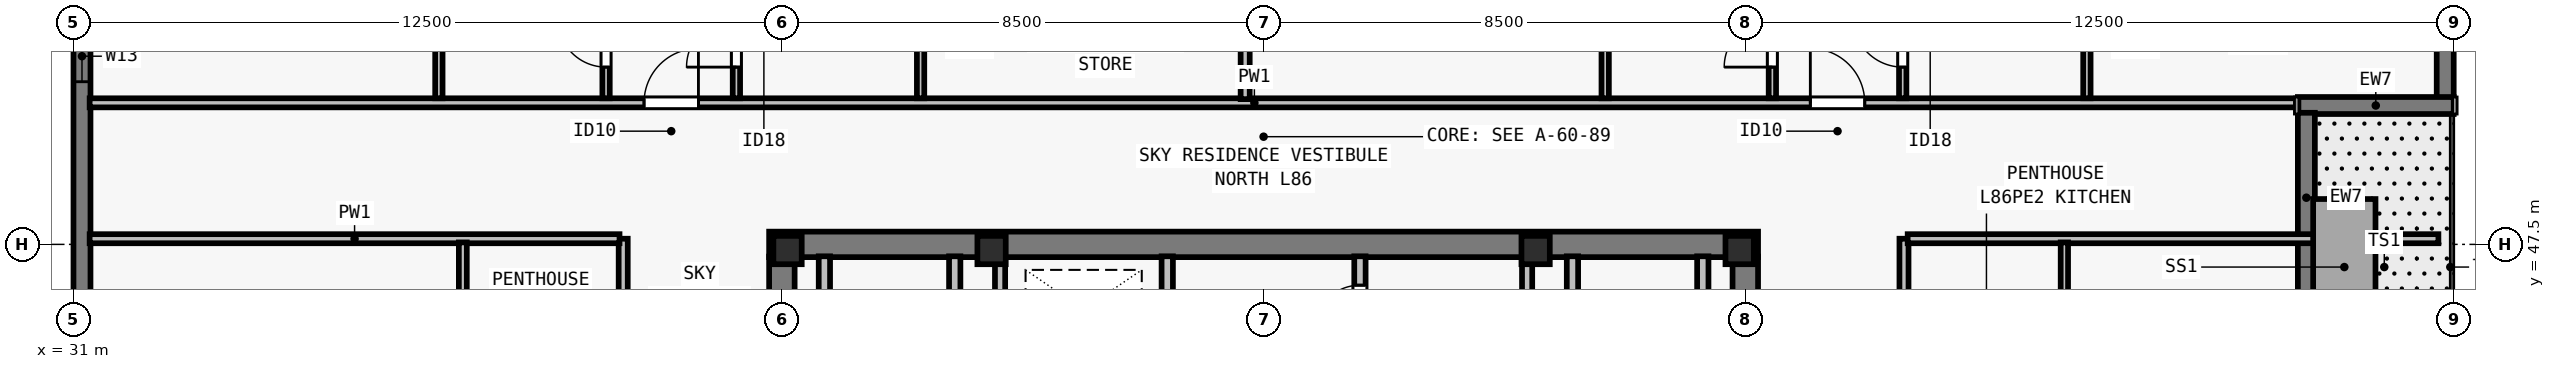
"""IFC4 building model, lengths in metres.
Left out: names, types, materials, properties, quantities, classifications, styles, units other than length and angle.
Written with IfcOpenShell. Run it as: python <this file> out.ifc"""

import sys

from ifc_helpers import new_model, si_unit, direction, frame, frame_2d, origin, origin_2d, place, context, subcontext, project, spatial, rectangle, i_section, extrude, element, fill, save


model = new_model("IFC4")
c1 = context("Model", 3, precision=1e-05, world=origin(), true_north=direction((0.0, 1.0)))
c2 = subcontext(c1, "Body", "Model", "MODEL_VIEW")
j1 = project(units=[si_unit("LENGTHUNIT", "METRE"), si_unit("PLANEANGLEUNIT", "RADIAN")], contexts=[c1])
p1 = place(None, origin())
s1 = spatial("IfcSite", under=j1, at=p1, CompositionType="ELEMENT")
p2 = place(p1, origin())
s2 = spatial("IfcBuilding", under=s1, at=p2, CompositionType="ELEMENT")
p3 = place(p2, frame((0.0, 0.0, 312.0)))
s3 = spatial("IfcBuildingStorey", under=s2, at=p3, CompositionType="ELEMENT", Elevation=312.0)
for number, where, z_axis, x_axis in (
    (1, (43.6, 47.4, 0.0), (0.0, 0.0, 1.0), (1.0, 0.0, 0.0)),
    (2, (47.2, 47.4, 0.0), (0.0, 0.0, 1.0), (1.0, 0.0, 0.0)),
    (3, (56.8, 47.4, 0.0), (0.0, 0.0, 1.0), (1.0, 0.0, 0.0)),
    (4, (60.4, 47.4, 0.0), (0.0, 0.0, 1.0), (1.0, 0.0, 0.0)),
):
    element("IfcColumn", number, at=place(p3, frame(where, z_axis=z_axis, x_axis=x_axis)), inside=s3, PredefinedType="COLUMN", context=c2, shape_type="SweptSolid", body=[
        extrude(i_section(OverallWidth=0.5, OverallDepth=0.5, WebThickness=0.028, FlangeThickness=0.045, at=origin_2d()), origin(), (0.0, 0.0, 1.0), 3.5),
    ])
p4 = place(p3, frame((31.15, 23.5, 0.0), z_axis=(0.0, 0.0, 1.0), x_axis=(0.0, 1.0, 0.0)))
e5 = element("IfcWall", 5, at=p4, inside=s3, PredefinedType="SOLIDWALL", context=c2, shape_type="SweptSolid", body=[
    extrude(rectangle(XDim=30.722, YDim=0.3, at=frame_2d((15.361, 0.0))), origin(), (0.0, 0.0, 1.0), 3.29),
])
p5 = place(p4, frame((4.944, 0.0, 0.8)))
e6 = element("IfcOpeningElement", 6, at=p5, cuts=e5, PredefinedType="OPENING", context=c2, shape_type="SweptSolid", body=[
    extrude(rectangle(XDim=1.65, YDim=1.758, at=frame_2d((0.825, 0.879))), frame((0.0, 0.16, 0.0), z_axis=(0.0, -1.0, 0.0), x_axis=(1.0, 0.0, 0.0)), (0.0, 0.0, 1.0), 0.32),
])
p6 = place(p4, frame((7.756, 0.0, 0.8)))
e7 = element("IfcOpeningElement", 7, at=p6, cuts=e5, PredefinedType="OPENING", context=c2, shape_type="SweptSolid", body=[
    extrude(rectangle(XDim=2.0, YDim=1.758, at=frame_2d((1.0, 0.879))), frame((0.0, 0.16, 0.0), z_axis=(0.0, -1.0, 0.0), x_axis=(1.0, 0.0, 0.0)), (0.0, 0.0, 1.0), 0.32),
])
p7 = place(p4, frame((12.617, 0.0, 0.8)))
e8 = element("IfcOpeningElement", 8, at=p7, cuts=e5, PredefinedType="OPENING", context=c2, shape_type="SweptSolid", body=[
    extrude(rectangle(XDim=1.65, YDim=1.758, at=frame_2d((0.825, 0.879))), frame((0.0, 0.16, 0.0), z_axis=(0.0, -1.0, 0.0), x_axis=(1.0, 0.0, 0.0)), (0.0, 0.0, 1.0), 0.32),
])
p8 = place(p4, frame((17.53, 0.0, 0.8)))
e9 = element("IfcOpeningElement", 9, at=p8, cuts=e5, PredefinedType="OPENING", context=c2, shape_type="SweptSolid", body=[
    extrude(rectangle(XDim=2.0, YDim=1.758, at=frame_2d((1.0, 0.879))), frame((0.0, 0.16, 0.0), z_axis=(0.0, -1.0, 0.0), x_axis=(1.0, 0.0, 0.0)), (0.0, 0.0, 1.0), 0.32),
])
p9 = place(p4, frame((21.142, 0.0, 0.8)))
e10 = element("IfcOpeningElement", 10, at=p9, cuts=e5, PredefinedType="OPENING", context=c2, shape_type="SweptSolid", body=[
    extrude(rectangle(XDim=1.65, YDim=1.758, at=frame_2d((0.825, 0.879))), frame((0.0, 0.16, 0.0), z_axis=(0.0, -1.0, 0.0), x_axis=(1.0, 0.0, 0.0)), (0.0, 0.0, 1.0), 0.32),
])
p10 = place(p4, frame((26.87, 0.0, 0.8)))
e11 = element("IfcOpeningElement", 11, at=p10, cuts=e5, PredefinedType="OPENING", context=c2, shape_type="SweptSolid", body=[
    extrude(rectangle(XDim=0.9, YDim=1.75, at=frame_2d((0.45, 0.875))), frame((0.0, 0.16, 0.0), z_axis=(0.0, -1.0, 0.0), x_axis=(1.0, 0.0, 0.0)), (0.0, 0.0, 1.0), 0.32),
])
p11 = place(p3, frame((72.85, 54.5, 0.0), z_axis=(0.0, 0.0, 1.0), x_axis=(0.0, -1.0, 0.0)))
e12 = element("IfcWall", 12, at=p11, inside=s3, PredefinedType="SOLIDWALL", context=c2, shape_type="SweptSolid", body=[
    extrude(rectangle(XDim=4.422, YDim=0.3, at=frame_2d((2.211, 0.0))), origin(), (0.0, 0.0, 1.0), 3.29),
])
p12 = place(p3, frame((73.0, 49.95, 0.0), z_axis=(0.0, 0.0, 1.0), x_axis=(-1.0, 0.0, 0.0)))
e13 = element("IfcWall", 13, at=p12, inside=s3, PredefinedType="SOLIDWALL", context=c2, shape_type="SweptSolid", body=[
    extrude(rectangle(XDim=2.75, YDim=0.3, at=frame_2d((1.375, 0.0))), origin(), (0.0, 0.0, 1.0), 3.29),
])
p13 = place(p3, frame((70.4, 49.822, 0.0), z_axis=(0.0, 0.0, 1.0), x_axis=(0.0, -1.0, 0.0)))
e14 = element("IfcWall", 14, at=p13, inside=s3, PredefinedType="SOLIDWALL", context=c2, shape_type="SweptSolid", body=[
    extrude(rectangle(XDim=5.722, YDim=0.3, at=frame_2d((2.861, 0.0))), origin(), (0.0, 0.0, 1.0), 3.29),
])
p14 = place(p13, frame((3.147, 0.0, 0.0)))
e15 = element("IfcOpeningElement", 15, at=p14, cuts=e14, PredefinedType="OPENING", context=c2, shape_type="SweptSolid", body=[
    extrude(rectangle(XDim=1.0, YDim=2.15, at=frame_2d((0.5, 1.075))), frame((0.0, 0.16, 0.0), z_axis=(0.0, -1.0, 0.0), x_axis=(1.0, 0.0, 0.0)), (0.0, 0.0, 1.0), 0.32),
])
p15 = place(p3, frame((43.275, 47.5, 0.0), z_axis=(0.0, 0.0, 1.0), x_axis=(1.0, 0.0, 0.0)))
e16 = element("IfcWall", 16, at=p15, inside=s3, PredefinedType="SHEAR", context=c2, shape_type="SweptSolid", body=[
    extrude(rectangle(XDim=17.45, YDim=0.45, at=frame_2d((8.725, 0.0))), origin(), (0.0, 0.0, 1.0), 3.29),
])
for number, where, z_axis, x_axis in (
    (17, (43.5, 40.8, 0.0), (0.0, 0.0, 1.0), (0.0, 1.0, 0.0)),
    (18, (60.5, 40.8, 0.0), (0.0, 0.0, 1.0), (0.0, 1.0, 0.0)),
):
    element("IfcWall", number, at=place(p3, frame(where, z_axis=z_axis, x_axis=x_axis)), inside=s3, PredefinedType="SHEAR", context=c2, shape_type="SweptSolid", body=[
        extrude(rectangle(XDim=6.485, YDim=0.45, at=frame_2d((3.242, 0.0))), origin(), (0.0, 0.0, 1.0), 3.29),
    ])
p16 = place(p3, frame((50.3, 40.585, 0.0), z_axis=(0.0, 0.0, 1.0), x_axis=(0.0, 1.0, 0.0)))
e19 = element("IfcWall", 19, at=p16, inside=s3, PredefinedType="SOLIDWALL", context=c2, shape_type="SweptSolid", body=[
    extrude(rectangle(XDim=6.705, YDim=0.2, at=frame_2d((3.353, 0.0))), origin(), (0.0, 0.0, 1.0), 3.29),
])
p17 = place(p16, frame((0.515, 0.0, 0.0)))
e20 = element("IfcOpeningElement", 20, at=p17, cuts=e19, PredefinedType="OPENING", context=c2, shape_type="SweptSolid", body=[
    extrude(rectangle(XDim=1.1, YDim=2.2, at=frame_2d((0.55, 1.1))), frame((0.0, 0.11, 0.0), z_axis=(0.0, -1.0, 0.0), x_axis=(1.0, 0.0, 0.0)), (0.0, 0.0, 1.0), 0.22),
])
p18 = place(p16, frame((3.015, 0.0, 0.0)))
e21 = element("IfcOpeningElement", 21, at=p18, cuts=e19, PredefinedType="OPENING", context=c2, shape_type="SweptSolid", body=[
    extrude(rectangle(XDim=1.1, YDim=2.2, at=frame_2d((0.55, 1.1))), frame((0.0, 0.11, 0.0), z_axis=(0.0, -1.0, 0.0), x_axis=(1.0, 0.0, 0.0)), (0.0, 0.0, 1.0), 0.22),
])
p19 = place(p16, frame((5.065, 0.0, 0.0)))
e22 = element("IfcOpeningElement", 22, at=p19, cuts=e19, PredefinedType="OPENING", context=c2, shape_type="SweptSolid", body=[
    extrude(rectangle(XDim=0.8, YDim=2.08, at=frame_2d((0.4, 1.04))), frame((0.0, 0.11, 0.0), z_axis=(0.0, -1.0, 0.0), x_axis=(1.0, 0.0, 0.0)), (0.0, 0.0, 1.0), 0.22),
])
p20 = place(p3, frame((53.7, 40.585, 0.0), z_axis=(0.0, 0.0, 1.0), x_axis=(0.0, 1.0, 0.0)))
e23 = element("IfcWall", 23, at=p20, inside=s3, PredefinedType="SOLIDWALL", context=c2, shape_type="SweptSolid", body=[
    extrude(rectangle(XDim=6.705, YDim=0.2, at=frame_2d((3.353, 0.0))), origin(), (0.0, 0.0, 1.0), 3.29),
])
p21 = place(p20, frame((0.195, 0.0, 0.0)))
e24 = element("IfcOpeningElement", 24, at=p21, cuts=e23, PredefinedType="OPENING", context=c2, shape_type="SweptSolid", body=[
    extrude(rectangle(XDim=0.8, YDim=2.08, at=frame_2d((0.4, 1.04))), frame((0.0, 0.11, 0.0), z_axis=(0.0, -1.0, 0.0), x_axis=(1.0, 0.0, 0.0)), (0.0, 0.0, 1.0), 0.22),
])
p22 = place(p20, frame((1.865, 0.0, 0.0)))
e25 = element("IfcOpeningElement", 25, at=p22, cuts=e23, PredefinedType="OPENING", context=c2, shape_type="SweptSolid", body=[
    extrude(rectangle(XDim=1.1, YDim=2.2, at=frame_2d((0.55, 1.1))), frame((0.0, 0.11, 0.0), z_axis=(0.0, -1.0, 0.0), x_axis=(1.0, 0.0, 0.0)), (0.0, 0.0, 1.0), 0.22),
])
p23 = place(p20, frame((3.735, 0.0, 0.0)))
e26 = element("IfcOpeningElement", 26, at=p23, cuts=e23, PredefinedType="OPENING", context=c2, shape_type="SweptSolid", body=[
    extrude(rectangle(XDim=0.9, YDim=2.12, at=frame_2d((0.45, 1.06))), frame((0.0, 0.11, 0.0), z_axis=(0.0, -1.0, 0.0), x_axis=(1.0, 0.0, 0.0)), (0.0, 0.0, 1.0), 0.22),
])
p24 = place(p20, frame((5.395, 0.0, 0.0)))
e27 = element("IfcOpeningElement", 27, at=p24, cuts=e23, PredefinedType="OPENING", context=c2, shape_type="SweptSolid", body=[
    extrude(rectangle(XDim=0.8, YDim=2.1, at=frame_2d((0.4, 1.05))), frame((0.0, 0.11, 0.0), z_axis=(0.0, -1.0, 0.0), x_axis=(1.0, 0.0, 0.0)), (0.0, 0.0, 1.0), 0.22),
])
for number, where, z_axis, x_axis in (
    (28, (46.55, 43.735, 0.0), (0.0, 0.0, 1.0), (0.0, 1.0, 0.0)),
    (29, (44.25, 43.735, 0.0), (0.0, 0.0, 1.0), (0.0, 1.0, 0.0)),
    (30, (57.45, 43.735, 0.0), (0.0, 0.0, 1.0), (0.0, 1.0, 0.0)),
    (31, (59.75, 43.735, 0.0), (0.0, 0.0, 1.0), (0.0, 1.0, 0.0)),
):
    element("IfcWall", number, at=place(p3, frame(where, z_axis=z_axis, x_axis=x_axis)), inside=s3, PredefinedType="SOLIDWALL", context=c2, shape_type="SweptSolid", body=[
        extrude(rectangle(XDim=3.555, YDim=0.2, at=frame_2d((1.777, 0.0))), origin(), (0.0, 0.0, 1.0), 3.29),
    ])
for number, where, z_axis, x_axis in (
    (32, (47.35, 43.735, 0.0), (0.0, 0.0, 1.0), (0.0, 1.0, 0.0)),
    (33, (56.65, 43.735, 0.0), (0.0, 0.0, 1.0), (0.0, 1.0, 0.0)),
):
    element("IfcWall", number, at=place(p3, frame(where, z_axis=z_axis, x_axis=x_axis)), inside=s3, PredefinedType="SOLIDWALL", context=c2, shape_type="SweptSolid", body=[
        extrude(rectangle(XDim=3.555, YDim=0.18, at=frame_2d((1.777, 0.0))), origin(), (0.0, 0.0, 1.0), 3.29),
    ])
p25 = place(p3, frame((31.285, 49.998, 0.0), z_axis=(0.0, 0.0, 1.0), x_axis=(1.0, 0.0, 0.0)))
e34 = element("IfcWall", 34, at=p25, inside=s3, PredefinedType="PARTITIONING", context=c2, shape_type="SweptSolid", body=[
    extrude(rectangle(XDim=38.975, YDim=0.16, at=frame_2d((19.488, 0.0))), origin(), (0.0, 0.0, 1.0), 3.009),
])
p26 = place(p25, frame((9.782, 0.0, 0.0)))
e35 = element("IfcOpeningElement", 35, at=p26, cuts=e34, PredefinedType="OPENING", context=c2, shape_type="SweptSolid", body=[
    extrude(rectangle(XDim=0.96, YDim=2.18, at=frame_2d((0.48, 1.09))), frame((0.0, 0.09, 0.0), z_axis=(0.0, -1.0, 0.0), x_axis=(1.0, 0.0, 0.0)), (0.0, 0.0, 1.0), 0.18),
])
p27 = place(p25, frame((30.363, 0.0, 0.0)))
e36 = element("IfcOpeningElement", 36, at=p27, cuts=e34, PredefinedType="OPENING", context=c2, shape_type="SweptSolid", body=[
    extrude(rectangle(XDim=0.96, YDim=2.18, at=frame_2d((0.48, 1.09))), frame((0.0, 0.09, 0.0), z_axis=(0.0, -1.0, 0.0), x_axis=(1.0, 0.0, 0.0)), (0.0, 0.0, 1.0), 0.18),
])
p28 = place(p3, frame((40.7, 30.4, 0.0), z_axis=(0.0, 0.0, 1.0), x_axis=(0.0, 1.0, 0.0)))
e37 = element("IfcWall", 37, at=p28, inside=s3, PredefinedType="PARTITIONING", context=c2, shape_type="SweptSolid", body=[
    extrude(rectangle(XDim=17.2, YDim=0.16, at=frame_2d((8.6, 0.0))), origin(), (0.0, 0.0, 1.0), 3.009),
])
p29 = place(p28, frame((8.12, 0.0, 0.0)))
e38 = element("IfcOpeningElement", 38, at=p29, cuts=e37, PredefinedType="OPENING", context=c2, shape_type="SweptSolid", body=[
    extrude(rectangle(XDim=0.96, YDim=2.18, at=frame_2d((0.48, 1.09))), frame((0.0, 0.09, 0.0), z_axis=(0.0, -1.0, 0.0), x_axis=(1.0, 0.0, 0.0)), (0.0, 0.0, 1.0), 0.18),
])
p30 = place(p3, frame((63.3, 30.4, 0.0), z_axis=(0.0, 0.0, 1.0), x_axis=(0.0, 1.0, 0.0)))
e39 = element("IfcWall", 39, at=p30, inside=s3, PredefinedType="PARTITIONING", context=c2, shape_type="SweptSolid", body=[
    extrude(rectangle(XDim=17.2, YDim=0.16, at=frame_2d((8.6, 0.0))), origin(), (0.0, 0.0, 1.0), 3.29),
])
p31 = place(p30, frame((3.82, 0.0, 0.0)))
e40 = element("IfcOpeningElement", 40, at=p31, cuts=e39, PredefinedType="OPENING", context=c2, shape_type="SweptSolid", body=[
    extrude(rectangle(XDim=0.96, YDim=2.18, at=frame_2d((0.48, 1.09))), frame((0.0, 0.09, 0.0), z_axis=(0.0, -1.0, 0.0), x_axis=(1.0, 0.0, 0.0)), (0.0, 0.0, 1.0), 0.18),
])
p32 = place(p30, frame((12.42, 0.0, 0.0)))
e41 = element("IfcOpeningElement", 41, at=p32, cuts=e39, PredefinedType="OPENING", context=c2, shape_type="SweptSolid", body=[
    extrude(rectangle(XDim=0.96, YDim=2.18, at=frame_2d((0.48, 1.09))), frame((0.0, 0.09, 0.0), z_axis=(0.0, -1.0, 0.0), x_axis=(1.0, 0.0, 0.0)), (0.0, 0.0, 1.0), 0.18),
])
p33 = place(p3, frame((31.285, 47.6, 0.0), z_axis=(0.0, 0.0, 1.0), x_axis=(1.0, 0.0, 0.0)))
e42 = element("IfcWall", 42, at=p33, inside=s3, PredefinedType="PARTITIONING", context=c2, shape_type="SweptSolid", body=[
    extrude(rectangle(XDim=9.35, YDim=0.16, at=frame_2d((4.675, 0.0))), origin(), (0.0, 0.0, 1.0), 3.29),
])
p34 = place(p3, frame((63.365, 47.6, 0.0), z_axis=(0.0, 0.0, 1.0), x_axis=(1.0, 0.0, 0.0)))
e43 = element("IfcWall", 43, at=p34, inside=s3, PredefinedType="PARTITIONING", context=c2, shape_type="SweptSolid", body=[
    extrude(rectangle(XDim=9.365, YDim=0.16, at=frame_2d((4.683, 0.0))), origin(), (0.0, 0.0, 1.0), 3.29),
])
p35 = place(p3, frame((37.448, 50.077, 0.0), z_axis=(0.0, 0.0, 1.0), x_axis=(0.0, 1.0, 0.0)))
e44 = element("IfcWall", 44, at=p35, inside=s3, PredefinedType="PLUMBINGWALL", context=c2, shape_type="SweptSolid", body=[
    extrude(rectangle(XDim=2.75, YDim=0.13, at=frame_2d((1.375, 0.0))), origin(), (0.0, 0.0, 1.0), 3.29),
])
p36 = place(p3, frame((40.397, 50.077, 0.0), z_axis=(0.0, 0.0, 1.0), x_axis=(0.0, 1.0, 0.0)))
e45 = element("IfcWall", 45, at=p36, inside=s3, PredefinedType="PLUMBINGWALL", context=c2, shape_type="SweptSolid", body=[
    extrude(rectangle(XDim=2.75, YDim=0.13, at=frame_2d((1.375, 0.0))), origin(), (0.0, 0.0, 1.0), 3.29),
])
p37 = place(p36, frame((0.55, 0.0, 0.0)))
e46 = element("IfcOpeningElement", 46, at=p37, cuts=e45, PredefinedType="OPENING", context=c2, shape_type="SweptSolid", body=[
    extrude(rectangle(XDim=0.85, YDim=2.08, at=frame_2d((0.425, 1.04))), frame((0.0, 0.075, 0.0), z_axis=(0.0, -1.0, 0.0), x_axis=(1.0, 0.0, 0.0)), (0.0, 0.0, 1.0), 0.15),
])
p38 = place(p3, frame((45.948, 50.077, 0.0), z_axis=(0.0, 0.0, 1.0), x_axis=(0.0, 1.0, 0.0)))
e47 = element("IfcWall", 47, at=p38, inside=s3, PredefinedType="PLUMBINGWALL", context=c2, shape_type="SweptSolid", body=[
    extrude(rectangle(XDim=2.75, YDim=0.13, at=frame_2d((1.375, 0.0))), origin(), (0.0, 0.0, 1.0), 3.29),
])
p39 = place(p3, frame((42.698, 50.077, 0.0), z_axis=(0.0, 0.0, 1.0), x_axis=(0.0, 1.0, 0.0)))
e48 = element("IfcWall", 48, at=p39, inside=s3, PredefinedType="PLUMBINGWALL", context=c2, shape_type="SweptSolid", body=[
    extrude(rectangle(XDim=2.75, YDim=0.13, at=frame_2d((1.375, 0.0))), origin(), (0.0, 0.0, 1.0), 3.29),
])
p40 = place(p39, frame((0.55, 0.0, 0.0)))
e49 = element("IfcOpeningElement", 49, at=p40, cuts=e48, PredefinedType="OPENING", context=c2, shape_type="SweptSolid", body=[
    extrude(rectangle(XDim=0.88, YDim=2.1, at=frame_2d((0.44, 1.05))), frame((0.0, 0.075, 0.0), z_axis=(0.0, -1.0, 0.0), x_axis=(1.0, 0.0, 0.0)), (0.0, 0.0, 1.0), 0.15),
])
p41 = place(p3, frame((51.675, 50.062, 0.0), z_axis=(0.0, 0.0, 1.0), x_axis=(0.0, 1.0, 0.0)))
e50 = element("IfcWall", 50, at=p41, inside=s3, PredefinedType="PARTITIONING", context=c2, shape_type="SweptSolid", body=[
    extrude(rectangle(XDim=9.653, YDim=0.16, at=frame_2d((4.826, 0.0))), origin(), (0.0, 0.0, 1.0), 3.009),
])
p42 = place(p3, frame((58.028, 50.077, 0.0), z_axis=(0.0, 0.0, 1.0), x_axis=(0.0, 1.0, 0.0)))
e51 = element("IfcWall", 51, at=p42, inside=s3, PredefinedType="PLUMBINGWALL", context=c2, shape_type="SweptSolid", body=[
    extrude(rectangle(XDim=2.75, YDim=0.13, at=frame_2d((1.375, 0.0))), origin(), (0.0, 0.0, 1.0), 3.29),
])
p43 = place(p3, frame((60.978, 50.077, 0.0), z_axis=(0.0, 0.0, 1.0), x_axis=(0.0, 1.0, 0.0)))
e52 = element("IfcWall", 52, at=p43, inside=s3, PredefinedType="PLUMBINGWALL", context=c2, shape_type="SweptSolid", body=[
    extrude(rectangle(XDim=2.75, YDim=0.13, at=frame_2d((1.375, 0.0))), origin(), (0.0, 0.0, 1.0), 3.29),
])
p44 = place(p43, frame((0.55, 0.0, 0.0)))
e53 = element("IfcOpeningElement", 53, at=p44, cuts=e52, PredefinedType="OPENING", context=c2, shape_type="SweptSolid", body=[
    extrude(rectangle(XDim=0.85, YDim=2.08, at=frame_2d((0.425, 1.04))), frame((0.0, 0.075, 0.0), z_axis=(0.0, -1.0, 0.0), x_axis=(1.0, 0.0, 0.0)), (0.0, 0.0, 1.0), 0.15),
])
p45 = place(p3, frame((66.528, 50.077, 0.0), z_axis=(0.0, 0.0, 1.0), x_axis=(0.0, 1.0, 0.0)))
e54 = element("IfcWall", 54, at=p45, inside=s3, PredefinedType="PLUMBINGWALL", context=c2, shape_type="SweptSolid", body=[
    extrude(rectangle(XDim=2.75, YDim=0.13, at=frame_2d((1.375, 0.0))), origin(), (0.0, 0.0, 1.0), 3.29),
])
p46 = place(p3, frame((63.278, 50.077, 0.0), z_axis=(0.0, 0.0, 1.0), x_axis=(0.0, 1.0, 0.0)))
e55 = element("IfcWall", 55, at=p46, inside=s3, PredefinedType="PLUMBINGWALL", context=c2, shape_type="SweptSolid", body=[
    extrude(rectangle(XDim=2.75, YDim=0.13, at=frame_2d((1.375, 0.0))), origin(), (0.0, 0.0, 1.0), 2.653),
])
p47 = place(p46, frame((0.55, 0.0, 0.0)))
e56 = element("IfcOpeningElement", 56, at=p47, cuts=e55, PredefinedType="OPENING", context=c2, shape_type="SweptSolid", body=[
    extrude(rectangle(XDim=0.88, YDim=2.1, at=frame_2d((0.44, 1.05))), frame((0.0, 0.075, 0.0), z_axis=(0.0, -1.0, 0.0), x_axis=(1.0, 0.0, 0.0)), (0.0, 0.0, 1.0), 0.15),
])
p48 = place(p3, frame((37.87, 43.475, 0.0), z_axis=(0.0, 0.0, 1.0), x_axis=(0.0, 1.0, 0.0)))
e57 = element("IfcWall", 57, at=p48, inside=s3, PredefinedType="PARTITIONING", context=c2, shape_type="SweptSolid", body=[
    extrude(rectangle(XDim=4.06, YDim=0.14, at=frame_2d((2.03, 0.0))), origin(), (0.0, 0.0, 1.0), 3.29),
])
p49 = place(p48, frame((0.375, 0.0, 0.0)))
e58 = element("IfcOpeningElement", 58, at=p49, cuts=e57, PredefinedType="OPENING", context=c2, shape_type="SweptSolid", body=[
    extrude(rectangle(XDim=0.82, YDim=2.1, at=frame_2d((0.41, 1.05))), frame((0.0, 0.08, 0.0), z_axis=(0.0, -1.0, 0.0), x_axis=(1.0, 0.0, 0.0)), (0.0, 0.0, 1.0), 0.16),
])
p50 = place(p3, frame((66.13, 44.5, 0.0), z_axis=(0.0, 0.0, 1.0), x_axis=(0.0, 1.0, 0.0)))
e59 = element("IfcWall", 59, at=p50, inside=s3, PredefinedType="PLUMBINGWALL", context=c2, shape_type="SweptSolid", body=[
    extrude(rectangle(XDim=3.035, YDim=0.13, at=frame_2d((1.518, 0.0))), origin(), (0.0, 0.0, 1.0), 3.29),
])
p51 = place(p10, origin())
e60 = element("IfcWindow", 60, at=p51, inside=s3, PartitioningType="SINGLE_PANEL", PredefinedType="WINDOW", context=c2, shape_type="SweptSolid", body=[
    extrude(rectangle(XDim=0.9, YDim=1.75, at=frame_2d((0.45, 0.875))), frame((0.0, -0.04, 0.0), z_axis=(0.0, -1.0, 0.0), x_axis=(1.0, 0.0, 0.0)), (0.0, 0.0, 1.0), 0.06),
])
fill(e11, e60)
p52 = place(p24, origin())
e61 = element("IfcDoor", 61, at=p52, inside=s3, OperationType="SINGLE_SWING_LEFT", PredefinedType="DOOR", context=c2, shape_type="SweptSolid", body=[
    extrude(rectangle(XDim=0.8, YDim=2.1, at=frame_2d((0.4, 1.05))), frame((0.0, 0.025, 0.0), z_axis=(0.0, -1.0, 0.0), x_axis=(1.0, 0.0, 0.0)), (0.0, 0.0, 1.0), 0.05),
])
fill(e27, e61)
p53 = place(p37, origin())
e62 = element("IfcDoor", 62, at=p53, inside=s3, OperationType="SINGLE_SWING_RIGHT", PredefinedType="DOOR", context=c2, shape_type="SweptSolid", body=[
    extrude(rectangle(XDim=0.85, YDim=2.08, at=frame_2d((0.425, 1.04))), frame((0.0, 0.025, 0.0), z_axis=(0.0, -1.0, 0.0), x_axis=(1.0, 0.0, 0.0)), (0.0, 0.0, 1.0), 0.05),
])
fill(e46, e62)
p54 = place(p40, origin())
e63 = element("IfcDoor", 63, at=p54, inside=s3, OperationType="SINGLE_SWING_LEFT", PredefinedType="DOOR", context=c2, shape_type="SweptSolid", body=[
    extrude(rectangle(XDim=0.88, YDim=2.1, at=frame_2d((0.44, 1.05))), frame((0.0, 0.025, 0.0), z_axis=(0.0, -1.0, 0.0), x_axis=(1.0, 0.0, 0.0)), (0.0, 0.0, 1.0), 0.05),
])
fill(e49, e63)
p55 = place(p26, origin())
e64 = element("IfcDoor", 64, at=p55, inside=s3, OperationType="SINGLE_SWING_RIGHT", PredefinedType="DOOR", context=c2, shape_type="SweptSolid", body=[
    extrude(rectangle(XDim=0.96, YDim=2.18, at=frame_2d((0.48, 1.09))), frame((0.0, 0.025, 0.0), z_axis=(0.0, -1.0, 0.0), x_axis=(1.0, 0.0, 0.0)), (0.0, 0.0, 1.0), 0.05),
])
fill(e35, e64)
p56 = place(p44, origin())
e65 = element("IfcDoor", 65, at=p56, inside=s3, OperationType="SINGLE_SWING_LEFT", PredefinedType="DOOR", context=c2, shape_type="SweptSolid", body=[
    extrude(rectangle(XDim=0.85, YDim=2.08, at=frame_2d((0.425, 1.04))), frame((0.0, 0.025, 0.0), z_axis=(0.0, -1.0, 0.0), x_axis=(1.0, 0.0, 0.0)), (0.0, 0.0, 1.0), 0.05),
])
fill(e53, e65)
p57 = place(p47, origin())
e66 = element("IfcDoor", 66, at=p57, inside=s3, OperationType="SINGLE_SWING_RIGHT", PredefinedType="DOOR", context=c2, shape_type="SweptSolid", body=[
    extrude(rectangle(XDim=0.88, YDim=2.1, at=frame_2d((0.44, 1.05))), frame((0.0, 0.025, 0.0), z_axis=(0.0, -1.0, 0.0), x_axis=(1.0, 0.0, 0.0)), (0.0, 0.0, 1.0), 0.05),
])
fill(e56, e66)
p58 = place(p27, origin())
e67 = element("IfcDoor", 67, at=p58, inside=s3, OperationType="SINGLE_SWING_LEFT", PredefinedType="DOOR", context=c2, shape_type="SweptSolid", body=[
    extrude(rectangle(XDim=0.96, YDim=2.18, at=frame_2d((0.48, 1.09))), frame((0.0, 0.025, 0.0), z_axis=(0.0, -1.0, 0.0), x_axis=(1.0, 0.0, 0.0)), (0.0, 0.0, 1.0), 0.05),
])
fill(e36, e67)
save(model, sys.argv[1])
